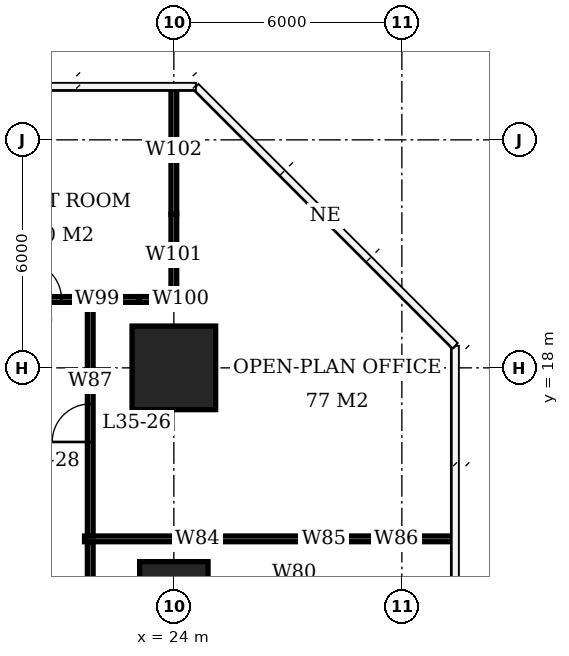
"""IFC4 building model, lengths in metres.
Left out: names, types, materials, properties, quantities, classifications, styles, units other than length and angle.
Written with IfcOpenShell. Run it as: python <this file> out.ifc"""

import sys

from ifc_helpers import new_model, si_unit, direction, frame, frame_2d, origin, origin_2d, place, context, subcontext, project, spatial, rectangle, extrude, element, fill, save


model = new_model("IFC4")
c1 = context("Model", 3, precision=1e-05, world=origin(), true_north=direction((0.0, 1.0)))
c2 = subcontext(c1, "Body", "Model", "MODEL_VIEW")
j1 = project(units=[si_unit("LENGTHUNIT", "METRE"), si_unit("PLANEANGLEUNIT", "RADIAN")], contexts=[c1])
p1 = place(None, origin())
s1 = spatial("IfcSite", under=j1, at=p1, CompositionType="ELEMENT")
p2 = place(p1, origin())
s2 = spatial("IfcBuilding", under=s1, at=p2, CompositionType="ELEMENT")
p3 = place(p2, frame((0.0, 0.0, 144.5)))
s3 = spatial("IfcBuildingStorey", under=s2, at=p3, CompositionType="ELEMENT", Elevation=144.5)
p4 = place(p3, frame((24.0, 12.0, 0.0), z_axis=(0.0, 0.0, 1.0), x_axis=(1.0, 0.0, 0.0)))
e1 = element("IfcColumn", 1, at=p4, inside=s3, PredefinedType="COLUMN", context=c2, shape_type="SweptSolid", body=[
    extrude(rectangle(XDim=1.8, YDim=1.8, at=origin_2d()), origin(), (0.0, 0.0, 1.0), 3.9),
])
p5 = place(p3, frame((24.0, 18.0, 0.0), z_axis=(0.0, 0.0, 1.0), x_axis=(1.0, 0.0, 0.0)))
e2 = element("IfcColumn", 2, at=p5, inside=s3, PredefinedType="COLUMN", context=c2, shape_type="SweptSolid", body=[
    extrude(rectangle(XDim=2.2, YDim=2.2, at=origin_2d()), origin(), (0.0, 0.0, 1.0), 3.9),
])
p6 = place(p3, frame((18.075, 19.8, 0.0), z_axis=(0.0, 0.0, 1.0), x_axis=(1.0, 0.0, 0.0)))
e3 = element("IfcWall", 3, at=p6, inside=s3, PredefinedType="PARTITIONING", context=c2, shape_type="SweptSolid", body=[
    extrude(rectangle(XDim=5.015, YDim=0.15, at=frame_2d((2.508, 0.0))), origin(), (0.0, 0.0, 1.0), 3.65),
])
p7 = place(p6, frame((1.97, 0.0, 0.0)))
e4 = element("IfcOpeningElement", 4, at=p7, cuts=e3, PredefinedType="OPENING", context=c2, shape_type="SweptSolid", body=[
    extrude(rectangle(XDim=1.0, YDim=2.1, at=frame_2d((0.5, 1.05))), frame((0.0, 0.085, 0.0), z_axis=(0.0, -1.0, 0.0), x_axis=(1.0, 0.0, 0.0)), (0.0, 0.0, 1.0), 0.17),
])
p8 = place(p3, frame((23.09, 19.8, 0.0), z_axis=(0.0, 0.0, 1.0), x_axis=(1.0, 0.0, 0.0)))
e5 = element("IfcWall", 5, at=p8, inside=s3, PredefinedType="PARTITIONING", context=c2, shape_type="SweptSolid", body=[
    extrude(rectangle(XDim=0.985, YDim=0.15, at=frame_2d((0.492, 0.0))), origin(), (0.0, 0.0, 1.0), 2.65),
])
p9 = place(p3, frame((24.0, 19.875, 0.0), z_axis=(0.0, 0.0, 1.0), x_axis=(0.0, 1.0, 0.0)))
e6 = element("IfcWall", 6, at=p9, inside=s3, PredefinedType="PARTITIONING", context=c2, shape_type="SweptSolid", body=[
    extrude(rectangle(XDim=2.17, YDim=0.15, at=frame_2d((1.085, 0.0))), origin(), (0.0, 0.0, 1.0), 2.65),
])
p10 = place(p3, frame((24.0, 22.045, 0.0), z_axis=(0.0, 0.0, 1.0), x_axis=(0.0, 1.0, 0.0)))
e7 = element("IfcWall", 7, at=p10, inside=s3, PredefinedType="PARTITIONING", context=c2, shape_type="SweptSolid", body=[
    extrude(rectangle(XDim=3.355, YDim=0.15, at=frame_2d((1.677, 0.0))), origin(), (0.0, 0.0, 1.0), 3.65),
])
p11 = place(p3, frame((21.8, 4.5, 0.0), z_axis=(0.0, 0.0, 1.0), x_axis=(0.0, 1.0, 0.0)))
e8 = element("IfcWall", 8, at=p11, inside=s3, PredefinedType="PARTITIONING", context=c2, shape_type="SweptSolid", body=[
    extrude(rectangle(XDim=8.925, YDim=0.15, at=frame_2d((4.462, 0.0))), origin(), (0.0, 0.0, 1.0), 3.65),
])
p12 = place(p11, frame((5.35, 0.0, 0.0)))
e9 = element("IfcOpeningElement", 9, at=p12, cuts=e8, PredefinedType="OPENING", context=c2, shape_type="SweptSolid", body=[
    extrude(rectangle(XDim=1.0, YDim=2.1, at=frame_2d((0.5, 1.05))), frame((0.0, 0.085, 0.0), z_axis=(0.0, -1.0, 0.0), x_axis=(1.0, 0.0, 0.0)), (0.0, 0.0, 1.0), 0.17),
])
p13 = place(p3, frame((21.8, 13.575, 0.0), z_axis=(0.0, 0.0, 1.0), x_axis=(0.0, 1.0, 0.0)))
e10 = element("IfcWall", 10, at=p13, inside=s3, PredefinedType="PARTITIONING", context=c2, shape_type="SweptSolid", body=[
    extrude(rectangle(XDim=6.15, YDim=0.15, at=frame_2d((3.075, 0.0))), origin(), (0.0, 0.0, 1.0), 3.65),
])
p14 = place(p13, frame((2.475, 0.0, 0.0)))
e11 = element("IfcOpeningElement", 11, at=p14, cuts=e10, PredefinedType="OPENING", context=c2, shape_type="SweptSolid", body=[
    extrude(rectangle(XDim=1.0, YDim=2.1, at=frame_2d((0.5, 1.05))), frame((0.0, 0.085, 0.0), z_axis=(0.0, -1.0, 0.0), x_axis=(1.0, 0.0, 0.0)), (0.0, 0.0, 1.0), 0.17),
])
p15 = place(p3, frame((21.65, 13.5, 0.0), z_axis=(0.0, 0.0, 1.0), x_axis=(1.0, 0.0, 0.0)))
e12 = element("IfcWall", 12, at=p15, inside=s3, PredefinedType="PARTITIONING", context=c2, shape_type="SweptSolid", body=[
    extrude(rectangle(XDim=5.94, YDim=0.15, at=frame_2d((2.97, 0.0))), origin(), (0.0, 0.0, 1.0), 3.65),
])
p16 = place(p3, frame((27.59, 13.5, 0.0), z_axis=(0.0, 0.0, 1.0), x_axis=(1.0, 0.0, 0.0)))
e13 = element("IfcWall", 13, at=p16, inside=s3, PredefinedType="PARTITIONING", context=c2, shape_type="SweptSolid", body=[
    extrude(rectangle(XDim=0.72, YDim=0.15, at=frame_2d((0.36, 0.0))), origin(), (0.0, 0.0, 1.0), 2.65),
])
p17 = place(p3, frame((28.31, 13.5, 0.0), z_axis=(0.0, 0.0, 1.0), x_axis=(1.0, 0.0, 0.0)))
e14 = element("IfcWall", 14, at=p17, inside=s3, PredefinedType="PARTITIONING", context=c2, shape_type="SweptSolid", body=[
    extrude(rectangle(XDim=3.09, YDim=0.15, at=frame_2d((1.545, 0.0))), origin(), (0.0, 0.0, 1.0), 3.65),
])
p18 = place(p7, origin())
e15 = element("IfcDoor", 15, at=p18, inside=s3, OperationType="SINGLE_SWING_LEFT", PredefinedType="DOOR", context=c2, shape_type="SweptSolid", body=[
    extrude(rectangle(XDim=1.0, YDim=2.1, at=frame_2d((0.5, 1.05))), frame((0.0, 0.025, 0.0), z_axis=(0.0, -1.0, 0.0), x_axis=(1.0, 0.0, 0.0)), (0.0, 0.0, 1.0), 0.05),
])
fill(e4, e15)
p19 = place(p14, origin())
e16 = element("IfcDoor", 16, at=p19, inside=s3, OperationType="SINGLE_SWING_LEFT", PredefinedType="DOOR", context=c2, shape_type="SweptSolid", body=[
    extrude(rectangle(XDim=1.0, YDim=2.1, at=frame_2d((0.5, 1.05))), frame((0.0, 0.025, 0.0), z_axis=(0.0, -1.0, 0.0), x_axis=(1.0, 0.0, 0.0)), (0.0, 0.0, 1.0), 0.05),
])
fill(e11, e16)
save(model, sys.argv[1])
